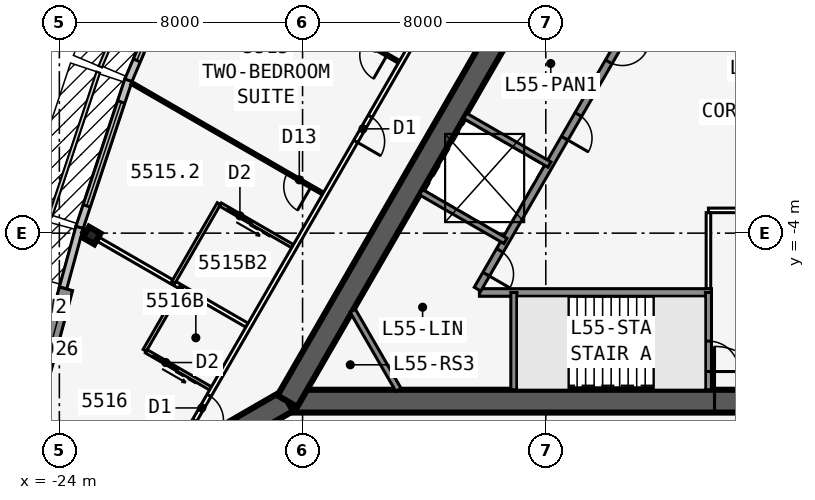
"""IFC4 building model, lengths in metres.
Left out: names, types, materials, properties, quantities, classifications, styles, units other than length and angle.
Written with IfcOpenShell. Run it as: python <this file> out.ifc"""

import sys

from ifc_helpers import new_model, si_unit, direction, frame, frame_2d, origin, origin_2d, place, context, subcontext, project, spatial, polyline, rectangle, i_section, outline, extrude, element, fill, save


model = new_model("IFC4")
c1 = context("Model", 3, precision=1e-05, world=origin(), true_north=direction((0.0, 1.0)))
c2 = subcontext(c1, "Body", "Model", "MODEL_VIEW")
j1 = project(units=[si_unit("LENGTHUNIT", "METRE"), si_unit("PLANEANGLEUNIT", "RADIAN")], contexts=[c1])
p1 = place(None, origin())
s1 = spatial("IfcSite", under=j1, at=p1, CompositionType="ELEMENT")
p2 = place(p1, origin())
s2 = spatial("IfcBuilding", under=s1, at=p2, CompositionType="ELEMENT")
p3 = place(p2, frame((0.0, 0.0, 208.1)))
s3 = spatial("IfcBuildingStorey", under=s2, at=p3, CompositionType="ELEMENT", Elevation=208.1)
p4 = place(p3, frame((-16.5, -9.526, 0.0), z_axis=(0.0, 0.0, 1.0), x_axis=(1.0, 0.0, 0.0)))
e1 = element("IfcWall", 1, at=p4, inside=s3, PredefinedType="SHEAR", context=c2, shape_type="SweptSolid", body=[
    extrude(rectangle(XDim=33.0, YDim=0.75, at=frame_2d((16.5, 0.0))), origin(), (0.0, 0.0, 1.0), 3.6),
])
p5 = place(p4, frame((14.05, 0.0, 0.0)))
e2 = element("IfcOpeningElement", 2, at=p5, cuts=e1, PredefinedType="OPENING", context=c2, shape_type="SweptSolid", body=[
    extrude(rectangle(XDim=1.8, YDim=2.13, at=frame_2d((0.9, 1.065))), frame((0.0, 0.385, 0.0), z_axis=(0.0, -1.0, 0.0), x_axis=(1.0, 0.0, 0.0)), (0.0, 0.0, 1.0), 0.77),
])
p6 = place(p3, frame((-10.183, -5.951, 0.0), z_axis=(0.0, 0.0, 1.0), x_axis=(1.0, 0.0, 0.0)))
e3 = element("IfcWall", 3, at=p6, inside=s3, PredefinedType="SOLIDWALL", context=c2, shape_type="SweptSolid", body=[
    extrude(rectangle(XDim=7.633, YDim=0.25, at=frame_2d((3.816, 0.0))), origin(), (0.0, 0.0, 1.0), 3.435),
])
p7 = place(p3, frame((-9.05, -5.951, 0.0), z_axis=(0.0, 0.0, 1.0), x_axis=(0.0, -1.0, 0.0)))
e4 = element("IfcWall", 4, at=p7, inside=s3, PredefinedType="SOLIDWALL", context=c2, shape_type="SweptSolid", body=[
    extrude(rectangle(XDim=3.2, YDim=0.2, at=frame_2d((1.6, 0.0))), origin(), (0.0, 0.0, 1.0), 3.435),
])
p8 = place(p3, frame((-2.65, -5.951, 0.0), z_axis=(0.0, 0.0, 1.0), x_axis=(0.0, -1.0, 0.0)))
e5 = element("IfcWall", 5, at=p8, inside=s3, PredefinedType="SOLIDWALL", context=c2, shape_type="SweptSolid", body=[
    extrude(rectangle(XDim=3.2, YDim=0.2, at=frame_2d((1.6, 0.0))), origin(), (0.0, 0.0, 1.0), 3.435),
])
p9 = place(p8, frame((1.6, 0.0, 0.0)))
e6 = element("IfcOpeningElement", 6, at=p9, cuts=e5, PredefinedType="OPENING", context=c2, shape_type="SweptSolid", body=[
    extrude(rectangle(XDim=1.0, YDim=2.13, at=frame_2d((0.5, 1.065))), frame((0.0, 0.11, 0.0), z_axis=(0.0, -1.0, 0.0), x_axis=(1.0, 0.0, 0.0)), (0.0, 0.0, 1.0), 0.22),
])
p10 = place(p3, frame((0.0, 19.052, 0.0), z_axis=(0.0, 0.0, 1.0), x_axis=(-0.499999749417, -0.866025548458, 0.0)))
e7 = element("IfcWall", 7, at=p10, inside=s3, PredefinedType="SHEAR", context=c2, shape_type="SweptSolid", body=[
    extrude(rectangle(XDim=33.0, YDim=0.75, at=frame_2d((16.5, 0.0))), origin(), (0.0, 0.0, 1.0), 3.6),
])
p11 = place(p10, frame((14.15, 0.0, 0.0)))
e8 = element("IfcOpeningElement", 8, at=p11, cuts=e7, PredefinedType="OPENING", context=c2, shape_type="SweptSolid", body=[
    extrude(rectangle(XDim=1.8, YDim=2.13, at=frame_2d((0.9, 1.065))), frame((0.0, 0.385, 0.0), z_axis=(0.0, -1.0, 0.0), x_axis=(1.0, 0.0, 0.0)), (0.0, 0.0, 1.0), 0.77),
])
p12 = place(p10, frame((12.6, 0.0, 0.0)))
e9 = element("IfcOpeningElement", 9, at=p12, cuts=e7, PredefinedType="OPENING", context=c2, shape_type="SweptSolid", body=[
    extrude(rectangle(XDim=1.0, YDim=2.13, at=frame_2d((0.5, 1.065))), frame((0.0, 0.385, 0.0), z_axis=(0.0, -1.0, 0.0), x_axis=(1.0, 0.0, 0.0)), (0.0, 0.0, 1.0), 0.77),
])
p13 = place(p3, frame((-4.929, 3.365, 0.0), z_axis=(0.0, 0.0, 1.0), x_axis=(-0.499991433582, -0.866030349552, 0.0)))
e10 = element("IfcWall", 10, at=p13, inside=s3, PredefinedType="SOLIDWALL", context=c2, shape_type="SweptSolid", body=[
    extrude(rectangle(XDim=10.633, YDim=0.25, at=frame_2d((5.316, 0.0))), origin(), (0.0, 0.0, 1.0), 3.435),
])
p14 = place(p13, frame((9.164, 0.0, 0.0)))
e11 = element("IfcOpeningElement", 11, at=p14, cuts=e10, PredefinedType="OPENING", context=c2, shape_type="SweptSolid", body=[
    extrude(rectangle(XDim=0.9, YDim=2.13, at=frame_2d((0.45, 1.065))), frame((0.0, 0.135, 0.0), z_axis=(0.0, -1.0, 0.0), x_axis=(1.0, 0.0, 0.0)), (0.0, 0.0, 1.0), 0.27),
])
p15 = place(p13, frame((1.1, 0.0, 0.0)))
e12 = element("IfcOpeningElement", 12, at=p15, cuts=e10, PredefinedType="OPENING", context=c2, shape_type="SweptSolid", body=[
    extrude(rectangle(XDim=0.9, YDim=2.13, at=frame_2d((0.45, 1.065))), frame((0.0, 0.135, 0.0), z_axis=(0.0, -1.0, 0.0), x_axis=(1.0, 0.0, 0.0)), (0.0, 0.0, 1.0), 0.27),
])
p16 = place(p13, frame((4.0, 0.0, 0.0)))
e13 = element("IfcOpeningElement", 13, at=p16, cuts=e10, PredefinedType="OPENING", context=c2, shape_type="SweptSolid", body=[
    extrude(rectangle(XDim=0.9, YDim=2.13, at=frame_2d((0.45, 1.065))), frame((0.0, 0.135, 0.0), z_axis=(0.0, -1.0, 0.0), x_axis=(1.0, 0.0, 0.0)), (0.0, 0.0, 1.0), 0.27),
])
p17 = place(p3, frame((-7.879, -1.744, 0.0), z_axis=(0.0, 0.0, 1.0), x_axis=(-0.866042017984, 0.499971222258, 0.0)))
e14 = element("IfcWall", 14, at=p17, inside=s3, PredefinedType="SOLIDWALL", context=c2, shape_type="SweptSolid", body=[
    extrude(rectangle(XDim=3.2, YDim=0.2, at=frame_2d((1.6, 0.0))), origin(), (0.0, 0.0, 1.0), 3.435),
])
p18 = place(p3, frame((-9.329, -4.256, 0.0), z_axis=(0.0, 0.0, 1.0), x_axis=(-0.866022944154, 0.50000426018, 0.0)))
e15 = element("IfcWall", 15, at=p18, inside=s3, PredefinedType="SOLIDWALL", context=c2, shape_type="SweptSolid", body=[
    extrude(rectangle(XDim=3.2, YDim=0.2, at=frame_2d((1.6, 0.0))), origin(), (0.0, 0.0, 1.0), 3.435),
])
p19 = place(p3, frame((-16.5, -9.526, 0.0), z_axis=(0.0, 0.0, 1.0), x_axis=(-0.866031398331, -0.499989616998, 0.0)))
e16 = element("IfcWall", 16, at=p19, inside=s3, PredefinedType="SHEAR", context=c2, shape_type="SweptSolid", body=[
    extrude(rectangle(XDim=4.746, YDim=0.75, at=frame_2d((2.373, 0.0))), origin(), (0.0, 0.0, 1.0), 3.6),
])
p20 = place(p19, frame((1.725, 0.0, 0.0)))
e17 = element("IfcOpeningElement", 17, at=p20, cuts=e16, PredefinedType="OPENING", context=c2, shape_type="SweptSolid", body=[
    extrude(rectangle(XDim=1.8, YDim=2.13, at=frame_2d((0.9, 1.065))), frame((0.0, 0.385, 0.0), z_axis=(0.0, -1.0, 0.0), x_axis=(1.0, 0.0, 0.0)), (0.0, 0.0, 1.0), 0.77),
])
p21 = place(p3, frame((-22.937, -4.078, 0.0), z_axis=(0.0, 0.0, 1.0), x_axis=(-0.5, -0.866025403784, 0.0)))
e18 = element("IfcColumn", 18, at=p21, inside=s3, PredefinedType="COLUMN", context=c2, shape_type="SweptSolid", body=[
    extrude(i_section(OverallWidth=0.411, OverallDepth=0.434, WebThickness=0.036, FlangeThickness=0.057, at=origin_2d()), origin(), (0.0, 0.0, 1.0), 3.6),
])
p22 = place(p3, frame((-19.768, 5.657, 0.0), z_axis=(0.0, 0.0, 1.0), x_axis=(-0.390096809471, -0.920773848044, 0.0)))
e19 = element("IfcWall", 19, at=p22, inside=s3, PredefinedType="STANDARD", context=c2, shape_type="SweptSolid", body=[
    extrude(rectangle(XDim=5.038, YDim=0.25, at=frame_2d((2.519, 0.0))), origin(), (0.0, 0.0, 1.0), 3.435),
])
p23 = place(p22, frame((0.719, 0.0, 0.45)))
e20 = element("IfcOpeningElement", 20, at=p23, cuts=e19, PredefinedType="OPENING", context=c2, shape_type="SweptSolid", body=[
    extrude(rectangle(XDim=3.6, YDim=2.6, at=frame_2d((1.8, 1.3))), frame((0.0, 0.135, 0.0), z_axis=(0.0, -1.0, 0.0), x_axis=(1.0, 0.0, 0.0)), (0.0, 0.0, 1.0), 0.27),
])
p24 = place(p3, frame((-21.729, 1.028, 0.0), z_axis=(0.0, 0.0, 1.0), x_axis=(-0.315108478109, -0.949055660656, 0.0)))
e21 = element("IfcWall", 21, at=p24, inside=s3, PredefinedType="STANDARD", context=c2, shape_type="SweptSolid", body=[
    extrude(rectangle(XDim=5.105, YDim=0.25, at=frame_2d((2.552, 0.0))), origin(), (0.0, 0.0, 1.0), 3.435),
])
p25 = place(p24, frame((0.752, 0.0, 0.45)))
e22 = element("IfcOpeningElement", 22, at=p25, cuts=e21, PredefinedType="OPENING", context=c2, shape_type="SweptSolid", body=[
    extrude(rectangle(XDim=3.6, YDim=2.6, at=frame_2d((1.8, 1.3))), frame((0.0, 0.135, 0.0), z_axis=(0.0, -1.0, 0.0), x_axis=(1.0, 0.0, 0.0)), (0.0, 0.0, 1.0), 0.27),
])
p26 = place(p3, frame((-23.336, -3.811, 0.0), z_axis=(0.0, 0.0, 1.0), x_axis=(-0.262867703986, -0.964831887015, 0.0)))
e23 = element("IfcWall", 23, at=p26, inside=s3, PredefinedType="STANDARD", context=c2, shape_type="SweptSolid", body=[
    extrude(rectangle(XDim=2.068, YDim=0.25, at=frame_2d((1.034, 0.0))), origin(), (0.0, 0.0, 1.0), 3.435),
])
p27 = place(p3, frame((-23.783, -5.832, 0.0), z_axis=(0.0, 0.0, 1.0), x_axis=(-0.258784695888, -0.965935029479, 0.0)))
e24 = element("IfcWall", 24, at=p27, inside=s3, PredefinedType="SOLIDWALL", context=c2, shape_type="SweptSolid", body=[
    extrude(rectangle(XDim=4.184, YDim=0.45, at=frame_2d((2.092, 0.0))), origin(), (0.0, 0.0, 1.0), 3.435),
])
p28 = place(p27, frame((0.592, 0.0, 0.45)))
e25 = element("IfcOpeningElement", 25, at=p28, cuts=e24, PredefinedType="OPENING", context=c2, shape_type="SweptSolid", body=[
    extrude(rectangle(XDim=3.0, YDim=2.6, at=frame_2d((1.5, 1.3))), frame((0.0, 0.235, 0.0), z_axis=(0.0, -1.0, 0.0), x_axis=(1.0, 0.0, 0.0)), (0.0, 0.0, 1.0), 0.47),
])
p29 = place(p3, frame((-24.865, -9.757, 0.0), z_axis=(0.0, 0.0, 1.0), x_axis=(0.258799282522, -0.96593112144, 0.0)))
e26 = element("IfcWall", 26, at=p29, inside=s3, PredefinedType="SOLIDWALL", context=c2, shape_type="SweptSolid", body=[
    extrude(outline(polyline([(4.184, 0.225), (4.125, 0.225), (3.705, 0.113), (3.675, 0.225), (0.0, 0.225), (0.0, -0.225), (4.184, -0.225), (4.184, 0.225)])), origin(), (0.0, 0.0, 1.0), 3.435),
])
p30 = place(p29, frame((0.713, 0.0, 0.45)))
e27 = element("IfcOpeningElement", 27, at=p30, cuts=e26, PredefinedType="OPENING", context=c2, shape_type="SweptSolid", body=[
    extrude(rectangle(XDim=2.4, YDim=2.6, at=frame_2d((1.2, 1.3))), frame((0.0, 0.235, 0.0), z_axis=(0.0, -1.0, 0.0), x_axis=(1.0, 0.0, 0.0)), (0.0, 0.0, 1.0), 0.47),
])
p31 = place(p3, frame((-0.425, 22.966, 0.0), z_axis=(0.0, 0.0, 1.0), x_axis=(-0.500000265775, -0.866025250339, 0.0)))
e28 = element("IfcWall", 28, at=p31, inside=s3, PredefinedType="PARTITIONING", context=c2, shape_type="SweptSolid", body=[
    extrude(rectangle(XDim=39.354, YDim=0.15, at=frame_2d((19.677, 0.0))), origin(), (0.0, 0.0, 1.0), 3.435),
])
p32 = place(p31, frame((1.102, 0.0, 0.0)))
e29 = element("IfcOpeningElement", 29, at=p32, cuts=e28, PredefinedType="OPENING", context=c2, shape_type="SweptSolid", body=[
    extrude(rectangle(XDim=0.95, YDim=2.13, at=frame_2d((0.475, 1.065))), frame((0.0, 0.085, 0.0), z_axis=(0.0, -1.0, 0.0), x_axis=(1.0, 0.0, 0.0)), (0.0, 0.0, 1.0), 0.17),
])
p33 = place(p31, frame((7.902, 0.0, 0.0)))
e30 = element("IfcOpeningElement", 30, at=p33, cuts=e28, PredefinedType="OPENING", context=c2, shape_type="SweptSolid", body=[
    extrude(rectangle(XDim=0.95, YDim=2.13, at=frame_2d((0.475, 1.065))), frame((0.0, 0.085, 0.0), z_axis=(0.0, -1.0, 0.0), x_axis=(1.0, 0.0, 0.0)), (0.0, 0.0, 1.0), 0.17),
])
p34 = place(p31, frame((17.302, 0.0, 0.0)))
e31 = element("IfcOpeningElement", 31, at=p34, cuts=e28, PredefinedType="OPENING", context=c2, shape_type="SweptSolid", body=[
    extrude(rectangle(XDim=0.95, YDim=2.13, at=frame_2d((0.475, 1.065))), frame((0.0, 0.085, 0.0), z_axis=(0.0, -1.0, 0.0), x_axis=(1.0, 0.0, 0.0)), (0.0, 0.0, 1.0), 0.17),
])
p35 = place(p31, frame((26.702, 0.0, 0.0)))
e32 = element("IfcOpeningElement", 32, at=p35, cuts=e28, PredefinedType="OPENING", context=c2, shape_type="SweptSolid", body=[
    extrude(rectangle(XDim=0.95, YDim=2.13, at=frame_2d((0.475, 1.065))), frame((0.0, 0.085, 0.0), z_axis=(0.0, -1.0, 0.0), x_axis=(1.0, 0.0, 0.0)), (0.0, 0.0, 1.0), 0.17),
])
p36 = place(p31, frame((37.302, 0.0, 0.0)))
e33 = element("IfcOpeningElement", 33, at=p36, cuts=e28, PredefinedType="OPENING", context=c2, shape_type="SweptSolid", body=[
    extrude(rectangle(XDim=0.95, YDim=2.13, at=frame_2d((0.475, 1.065))), frame((0.0, 0.085, 0.0), z_axis=(0.0, -1.0, 0.0), x_axis=(1.0, 0.0, 0.0)), (0.0, 0.0, 1.0), 0.17),
])
p37 = place(p3, frame((-12.829, 1.633, 0.0), z_axis=(0.0, 0.0, 1.0), x_axis=(-0.866030558329, 0.49999107196, 0.0)))
e34 = element("IfcWall", 34, at=p37, inside=s3, PredefinedType="PARTITIONING", context=c2, shape_type="SweptSolid", body=[
    extrude(rectangle(XDim=7.894, YDim=0.1, at=frame_2d((3.947, 0.0))), origin(), (0.0, 0.0, 1.0), 2.589),
])
p38 = place(p37, frame((0.45, 0.0, 0.0)))
e35 = element("IfcOpeningElement", 35, at=p38, cuts=e34, PredefinedType="OPENING", context=c2, shape_type="SweptSolid", body=[
    extrude(rectangle(XDim=0.9, YDim=2.13, at=frame_2d((0.45, 1.065))), frame((0.0, 0.06, 0.0), z_axis=(0.0, -1.0, 0.0), x_axis=(1.0, 0.0, 0.0)), (0.0, 0.0, 1.0), 0.12),
])
p39 = place(p3, frame((-15.329, -2.697, 0.0), z_axis=(0.0, 0.0, 1.0), x_axis=(-0.866032413668, 0.499987858329, 0.0)))
e36 = element("IfcWall", 36, at=p39, inside=s3, PredefinedType="PARTITIONING", context=c2, shape_type="SweptSolid", body=[
    extrude(rectangle(XDim=7.273, YDim=0.1, at=frame_2d((3.636, 0.0))), origin(), (0.0, 0.0, 1.0), 2.589),
])
p40 = place(p39, frame((0.45, 0.0, 0.0)))
e37 = element("IfcOpeningElement", 37, at=p40, cuts=e36, PredefinedType="OPENING", context=c2, shape_type="SweptSolid", body=[
    extrude(rectangle(XDim=0.9, YDim=2.13, at=frame_2d((0.45, 1.065))), frame((0.0, 0.06, 0.0), z_axis=(0.0, -1.0, 0.0), x_axis=(1.0, 0.0, 0.0)), (0.0, 0.0, 1.0), 0.12),
])
p41 = place(p3, frame((-17.829, -7.027, 0.0), z_axis=(0.0, 0.0, 1.0), x_axis=(-0.866026604282, 0.499997920671, 0.0)))
e38 = element("IfcWall", 38, at=p41, inside=s3, PredefinedType="PARTITIONING", context=c2, shape_type="SweptSolid", body=[
    extrude(rectangle(XDim=6.24, YDim=0.15, at=frame_2d((3.12, 0.0))), origin(), (0.0, 0.0, 1.0), 2.589),
])
p42 = place(p3, frame((-18.753, -3.029, 0.0), z_axis=(0.0, 0.0, 1.0), x_axis=(-0.50002537861, -0.866010750942, 0.0)))
e39 = element("IfcWall", 39, at=p42, inside=s3, PredefinedType="PLUMBINGWALL", context=c2, shape_type="SweptSolid", body=[
    extrude(rectangle(XDim=3.0, YDim=0.12, at=frame_2d((1.5, 0.0))), origin(), (0.0, 0.0, 1.0), 3.435),
])
p43 = place(p3, frame((-16.329, -4.429, 0.0), z_axis=(0.0, 0.0, 1.0), x_axis=(-0.865997131366, 0.500048966069, 0.0)))
e40 = element("IfcWall", 40, at=p43, inside=s3, PredefinedType="PLUMBINGWALL", context=c2, shape_type="SweptSolid", body=[
    extrude(rectangle(XDim=2.74, YDim=0.12, at=frame_2d((1.37, 0.0))), origin(), (0.0, 0.0, 1.0), 3.435),
])
p44 = place(p43, frame((1.55, 0.0, 0.0)))
e41 = element("IfcOpeningElement", 41, at=p44, cuts=e40, PredefinedType="OPENING", context=c2, shape_type="SweptSolid", body=[
    extrude(rectangle(XDim=0.9, YDim=2.13, at=frame_2d((0.45, 1.065))), frame((0.0, 0.07, 0.0), z_axis=(0.0, -1.0, 0.0), x_axis=(1.0, 0.0, 0.0)), (0.0, 0.0, 1.0), 0.14),
])
p45 = place(p3, frame((-19.993, -5.777, 0.0), z_axis=(0.0, 0.0, 1.0), x_axis=(-0.500033551112, -0.866006032174, 0.0)))
e42 = element("IfcWall", 42, at=p45, inside=s3, PredefinedType="PLUMBINGWALL", context=c2, shape_type="SweptSolid", body=[
    extrude(rectangle(XDim=2.4, YDim=0.12, at=frame_2d((1.2, 0.0))), origin(), (0.0, 0.0, 1.0), 3.435),
])
p46 = place(p3, frame((-19.029, -9.106, 0.0), z_axis=(0.0, 0.0, 1.0), x_axis=(-0.866023955769, 0.500002508028, 0.0)))
e43 = element("IfcWall", 43, at=p46, inside=s3, PredefinedType="PLUMBINGWALL", context=c2, shape_type="SweptSolid", body=[
    extrude(rectangle(XDim=2.44, YDim=0.12, at=frame_2d((1.22, 0.0))), origin(), (0.0, 0.0, 1.0), 3.435),
])
p47 = place(p46, frame((1.25, 0.0, 0.0)))
e44 = element("IfcOpeningElement", 44, at=p47, cuts=e43, PredefinedType="OPENING", context=c2, shape_type="SweptSolid", body=[
    extrude(rectangle(XDim=0.9, YDim=2.13, at=frame_2d((0.45, 1.065))), frame((0.0, 0.07, 0.0), z_axis=(0.0, -1.0, 0.0), x_axis=(1.0, 0.0, 0.0)), (0.0, 0.0, 1.0), 0.14),
])
p48 = place(p3, frame((-2.65, -3.251, 0.0), z_axis=(0.0, 0.0, 1.0), x_axis=(1.0, 0.0, 0.0)))
e45 = element("IfcWall", 45, at=p48, inside=s3, PredefinedType="PARTITIONING", context=c2, shape_type="SweptSolid", body=[
    extrude(rectangle(XDim=8.35, YDim=0.15, at=frame_2d((4.175, 0.0))), origin(), (0.0, 0.0, 1.0), 3.435),
])
p49 = place(p3, frame((-2.65, -5.826, 0.0), z_axis=(0.0, 0.0, 1.0), x_axis=(0.0, 1.0, 0.0)))
e46 = element("IfcWall", 46, at=p49, inside=s3, PredefinedType="PARTITIONING", context=c2, shape_type="SweptSolid", body=[
    extrude(rectangle(XDim=2.5, YDim=0.15, at=frame_2d((1.25, 0.0))), origin(), (0.0, 0.0, 1.0), 3.435),
])
p50 = place(p3, frame((-12.848, -9.151, 0.0), z_axis=(0.0, 0.0, 1.0), x_axis=(-0.499952404951, 0.866052881055, 0.0)))
e47 = element("IfcWall", 47, at=p50, inside=s3, PredefinedType="SOLIDWALL", context=c2, shape_type="SweptSolid", body=[
    extrude(rectangle(XDim=3.002, YDim=0.2, at=frame_2d((1.501, 0.0))), origin(), (0.0, 0.0, 1.0), 3.435),
])
p51 = place(p3, frame((-7.247, -7.576, 0.0), z_axis=(0.0, 0.0, 1.0), x_axis=(1.0, 0.0, 0.0)))
e48 = element("IfcWall", 48, at=p51, inside=s3, PredefinedType="SOLIDWALL", context=c2, shape_type="SweptSolid", body=[
    extrude(rectangle(XDim=2.794, YDim=0.1, at=frame_2d((1.397, 0.0))), origin(), (0.0, 0.0, 1.0), 3.6),
])
p52 = place(p23, origin())
e49 = element("IfcWindow", 49, at=p52, inside=s3, PartitioningType="SINGLE_PANEL", PredefinedType="WINDOW", context=c2, shape_type="SweptSolid", body=[
    extrude(rectangle(XDim=3.6, YDim=2.6, at=frame_2d((1.8, 1.3))), frame((0.0, 0.03, 0.0), z_axis=(0.0, -1.0, 0.0), x_axis=(1.0, 0.0, 0.0)), (0.0, 0.0, 1.0), 0.06),
])
fill(e20, e49)
p53 = place(p25, origin())
e50 = element("IfcWindow", 50, at=p53, inside=s3, PartitioningType="SINGLE_PANEL", PredefinedType="WINDOW", context=c2, shape_type="SweptSolid", body=[
    extrude(rectangle(XDim=3.6, YDim=2.6, at=frame_2d((1.8, 1.3))), frame((0.0, 0.03, 0.0), z_axis=(0.0, -1.0, 0.0), x_axis=(1.0, 0.0, 0.0)), (0.0, 0.0, 1.0), 0.06),
])
fill(e22, e50)
p54 = place(p28, origin())
e51 = element("IfcWindow", 51, at=p54, inside=s3, PartitioningType="SINGLE_PANEL", PredefinedType="WINDOW", context=c2, shape_type="SweptSolid", body=[
    extrude(rectangle(XDim=3.0, YDim=2.6, at=frame_2d((1.5, 1.3))), frame((0.0, 0.03, 0.0), z_axis=(0.0, -1.0, 0.0), x_axis=(1.0, 0.0, 0.0)), (0.0, 0.0, 1.0), 0.06),
])
fill(e25, e51)
p55 = place(p38, origin())
e52 = element("IfcDoor", 52, at=p55, inside=s3, OperationType="SINGLE_SWING_LEFT", PredefinedType="DOOR", context=c2, shape_type="SweptSolid", body=[
    extrude(rectangle(XDim=0.9, YDim=2.13, at=frame_2d((0.45, 1.065))), frame((0.0, 0.025, 0.0), z_axis=(0.0, -1.0, 0.0), x_axis=(1.0, 0.0, 0.0)), (0.0, 0.0, 1.0), 0.05),
])
fill(e35, e52)
p56 = place(p40, origin())
e53 = element("IfcDoor", 53, at=p56, inside=s3, OperationType="SINGLE_SWING_LEFT", PredefinedType="DOOR", context=c2, shape_type="SweptSolid", body=[
    extrude(rectangle(XDim=0.9, YDim=2.13, at=frame_2d((0.45, 1.065))), frame((0.0, 0.025, 0.0), z_axis=(0.0, -1.0, 0.0), x_axis=(1.0, 0.0, 0.0)), (0.0, 0.0, 1.0), 0.05),
])
fill(e37, e53)
p57 = place(p35, origin())
e54 = element("IfcDoor", 54, at=p57, inside=s3, OperationType="SINGLE_SWING_RIGHT", PredefinedType="DOOR", context=c2, shape_type="SweptSolid", body=[
    extrude(rectangle(XDim=0.95, YDim=2.13, at=frame_2d((0.475, 1.065))), frame((0.0, 0.025, 0.0), z_axis=(0.0, -1.0, 0.0), x_axis=(1.0, 0.0, 0.0)), (0.0, 0.0, 1.0), 0.05),
])
fill(e32, e54)
p58 = place(p44, origin())
e55 = element("IfcDoor", 55, at=p58, inside=s3, OperationType="SLIDING_TO_LEFT", PredefinedType="DOOR", context=c2, shape_type="SweptSolid", body=[
    extrude(rectangle(XDim=0.9, YDim=2.13, at=frame_2d((0.45, 1.065))), frame((0.0, 0.025, 0.0), z_axis=(0.0, -1.0, 0.0), x_axis=(1.0, 0.0, 0.0)), (0.0, 0.0, 1.0), 0.05),
])
fill(e41, e55)
p59 = place(p47, origin())
e56 = element("IfcDoor", 56, at=p59, inside=s3, OperationType="SLIDING_TO_LEFT", PredefinedType="DOOR", context=c2, shape_type="SweptSolid", body=[
    extrude(rectangle(XDim=0.9, YDim=2.13, at=frame_2d((0.45, 1.065))), frame((0.0, 0.025, 0.0), z_axis=(0.0, -1.0, 0.0), x_axis=(1.0, 0.0, 0.0)), (0.0, 0.0, 1.0), 0.05),
])
fill(e44, e56)
p60 = place(p36, origin())
e57 = element("IfcDoor", 57, at=p60, inside=s3, OperationType="SINGLE_SWING_RIGHT", PredefinedType="DOOR", context=c2, shape_type="SweptSolid", body=[
    extrude(rectangle(XDim=0.95, YDim=2.13, at=frame_2d((0.475, 1.065))), frame((0.0, 0.025, 0.0), z_axis=(0.0, -1.0, 0.0), x_axis=(1.0, 0.0, 0.0)), (0.0, 0.0, 1.0), 0.05),
])
fill(e33, e57)
p61 = place(p5, origin())
e58 = element("IfcDoor", 58, at=p61, inside=s3, OperationType="DOUBLE_DOOR_SINGLE_SWING", PredefinedType="DOOR", context=c2, shape_type="SweptSolid", body=[
    extrude(rectangle(XDim=1.8, YDim=2.13, at=frame_2d((0.9, 1.065))), frame((0.0, 0.025, 0.0), z_axis=(0.0, -1.0, 0.0), x_axis=(1.0, 0.0, 0.0)), (0.0, 0.0, 1.0), 0.05),
])
fill(e2, e58)
p62 = place(p9, origin())
e59 = element("IfcDoor", 59, at=p62, inside=s3, OperationType="SINGLE_SWING_RIGHT", PredefinedType="DOOR", context=c2, shape_type="SweptSolid", body=[
    extrude(rectangle(XDim=1.0, YDim=2.13, at=frame_2d((0.5, 1.065))), frame((0.0, 0.025, 0.0), z_axis=(0.0, -1.0, 0.0), x_axis=(1.0, 0.0, 0.0)), (0.0, 0.0, 1.0), 0.05),
])
fill(e6, e59)
p63 = place(p14, origin())
e60 = element("IfcDoor", 60, at=p63, inside=s3, OperationType="SINGLE_SWING_RIGHT", PredefinedType="DOOR", context=c2, shape_type="SweptSolid", body=[
    extrude(rectangle(XDim=0.9, YDim=2.13, at=frame_2d((0.45, 1.065))), frame((0.0, 0.025, 0.0), z_axis=(0.0, -1.0, 0.0), x_axis=(1.0, 0.0, 0.0)), (0.0, 0.0, 1.0), 0.05),
])
fill(e11, e60)
p64 = place(p15, origin())
e61 = element("IfcDoor", 61, at=p64, inside=s3, OperationType="SINGLE_SWING_LEFT", PredefinedType="DOOR", context=c2, shape_type="SweptSolid", body=[
    extrude(rectangle(XDim=0.9, YDim=2.13, at=frame_2d((0.45, 1.065))), frame((0.0, 0.025, 0.0), z_axis=(0.0, -1.0, 0.0), x_axis=(1.0, 0.0, 0.0)), (0.0, 0.0, 1.0), 0.05),
])
fill(e12, e61)
p65 = place(p16, origin())
e62 = element("IfcDoor", 62, at=p65, inside=s3, OperationType="SINGLE_SWING_RIGHT", PredefinedType="DOOR", context=c2, shape_type="SweptSolid", body=[
    extrude(rectangle(XDim=0.9, YDim=2.13, at=frame_2d((0.45, 1.065))), frame((0.0, 0.025, 0.0), z_axis=(0.0, -1.0, 0.0), x_axis=(1.0, 0.0, 0.0)), (0.0, 0.0, 1.0), 0.05),
])
fill(e13, e62)
save(model, sys.argv[1])
